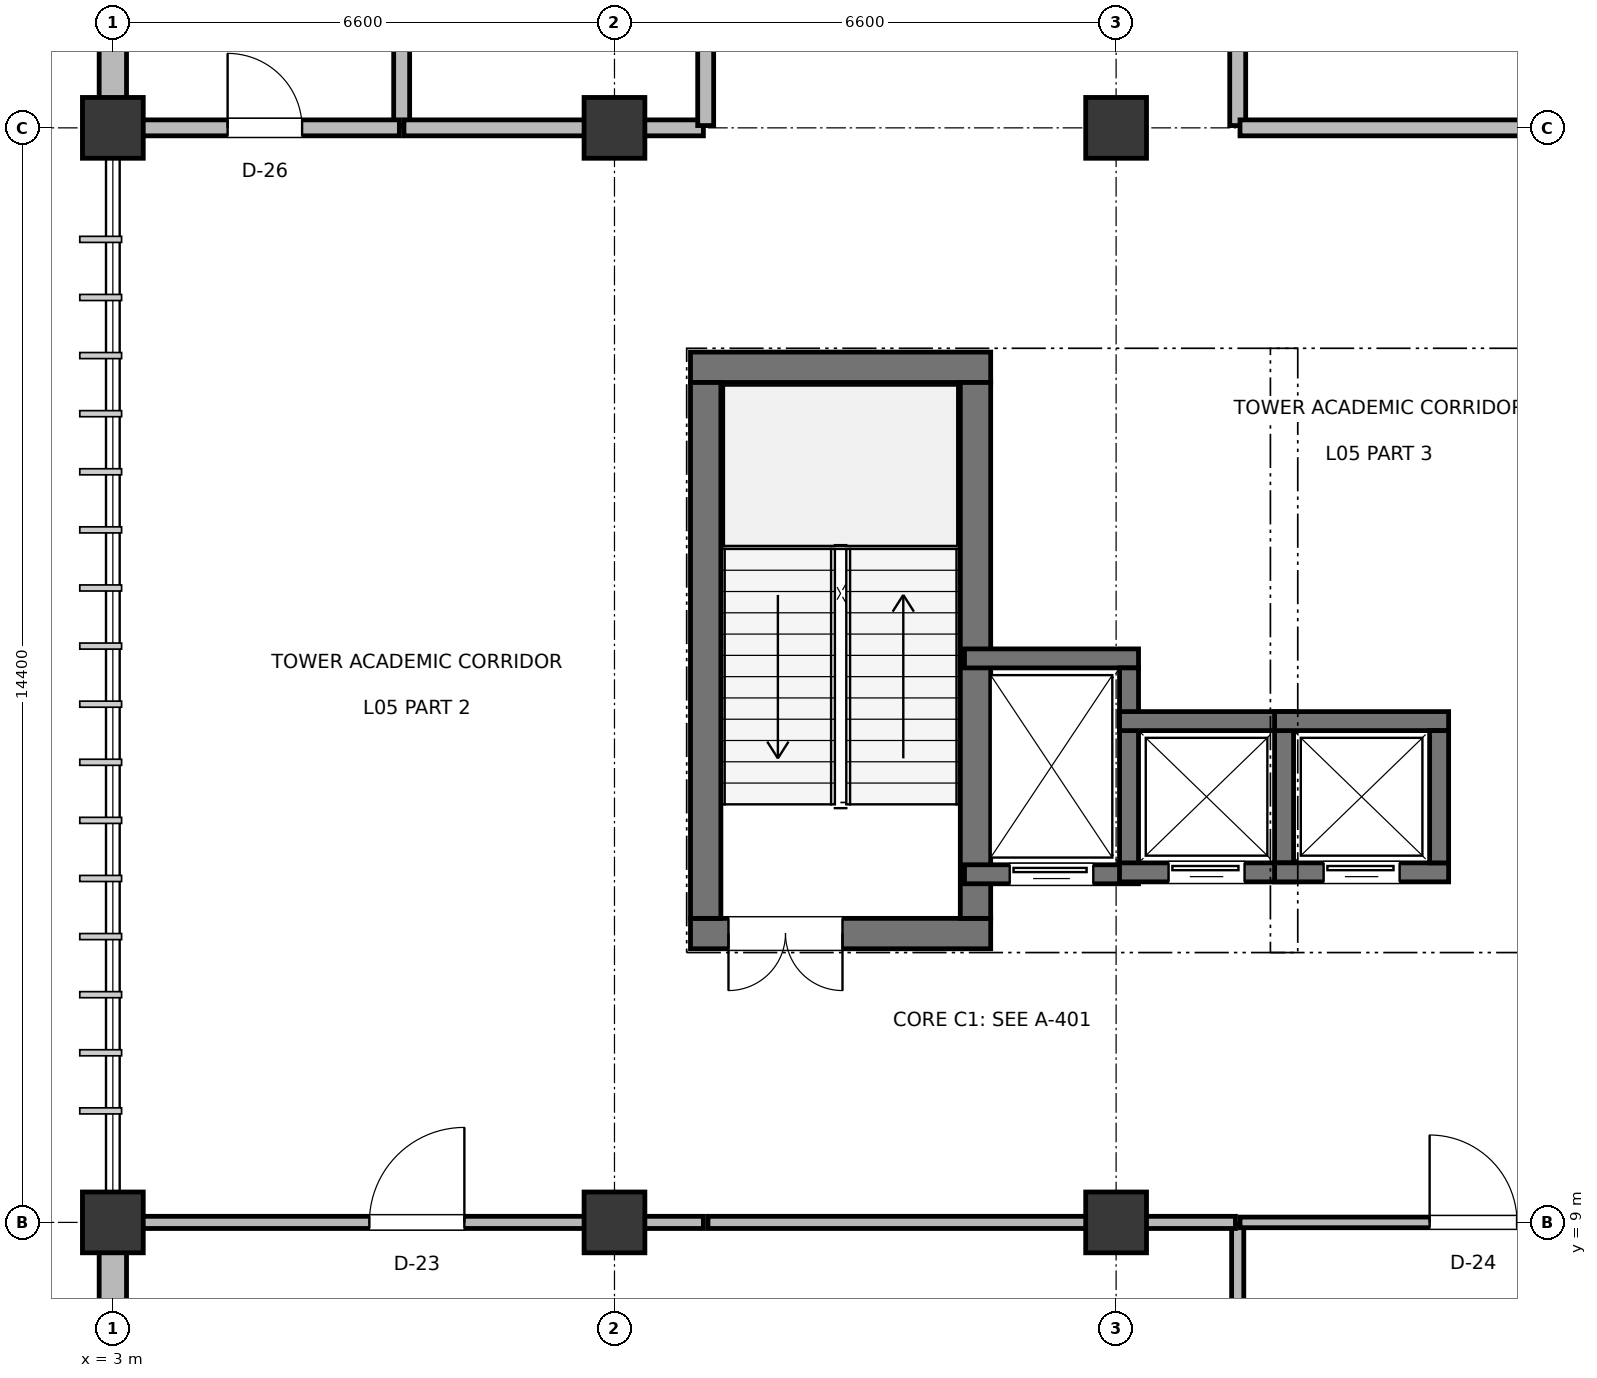
"""IFC4 building model, lengths in metres.
Left out: names, types, materials, properties, quantities, classifications, styles, units other than length and angle.
Written with IfcOpenShell. Run it as: python <this file> out.ifc"""

import sys

from ifc_helpers import new_model, si_unit, direction, frame, frame_2d, origin, origin_2d, place, context, subcontext, project, spatial, rectangle, extrude, element, fill, save


model = new_model("IFC4")
c1 = context("Model", 3, precision=1e-05, world=origin(), true_north=direction((0.0, 1.0)))
c2 = subcontext(c1, "Body", "Model", "MODEL_VIEW")
j1 = project(units=[si_unit("LENGTHUNIT", "METRE"), si_unit("PLANEANGLEUNIT", "RADIAN")], contexts=[c1])
p1 = place(None, origin())
s1 = spatial("IfcSite", under=j1, at=p1, CompositionType="ELEMENT")
p2 = place(p1, origin())
s2 = spatial("IfcBuilding", under=s1, at=p2, CompositionType="ELEMENT")
p3 = place(p2, frame((0.0, 0.0, 24.0)))
s3 = spatial("IfcBuildingStorey", under=s2, at=p3, CompositionType="ELEMENT", Elevation=24.0)
for number, where, z_axis, x_axis in (
    (1, (3.0, 9.0, 0.0), (0.0, 0.0, 1.0), (1.0, 0.0, 0.0)),
    (2, (3.0, 23.4, 0.0), (0.0, 0.0, 1.0), (1.0, 0.0, 0.0)),
    (3, (9.6, 9.0, 0.0), (0.0, 0.0, 1.0), (1.0, 0.0, 0.0)),
    (4, (9.6, 23.4, 0.0), (0.0, 0.0, 1.0), (1.0, 0.0, 0.0)),
    (5, (16.2, 9.0, 0.0), (0.0, 0.0, 1.0), (1.0, 0.0, 0.0)),
    (6, (16.2, 23.4, 0.0), (0.0, 0.0, 1.0), (1.0, 0.0, 0.0)),
):
    element("IfcColumn", number, at=place(p3, frame(where, z_axis=z_axis, x_axis=x_axis)), inside=s3, PredefinedType="COLUMN", context=c2, shape_type="SweptSolid", body=[
        extrude(rectangle(XDim=0.8, YDim=0.8, at=origin_2d()), origin(), (0.0, 0.0, 1.0), 4.5),
    ])
p4 = place(p3, frame((3.0, 3.385, 0.0), z_axis=(0.0, 0.0, 1.0), x_axis=(0.0, 1.0, 0.0)))
e7 = element("IfcWall", 7, at=p4, inside=s3, PredefinedType="SOLIDWALL", context=c2, shape_type="SweptSolid", body=[
    extrude(rectangle(XDim=5.23, YDim=0.36, at=frame_2d((2.615, 0.0))), origin(), (0.0, 0.0, 1.0), 3.575),
])
p5 = place(p4, frame((2.165, 0.0, 0.9)))
e8 = element("IfcOpeningElement", 8, at=p5, cuts=e7, PredefinedType="OPENING", context=c2, shape_type="SweptSolid", body=[
    extrude(rectangle(XDim=0.9, YDim=1.8, at=frame_2d((0.45, 0.9))), frame((0.0, 0.19, 0.0), z_axis=(0.0, -1.0, 0.0), x_axis=(1.0, 0.0, 0.0)), (0.0, 0.0, 1.0), 0.38),
])
p6 = place(p3, frame((3.0, 23.785, 0.0), z_axis=(0.0, 0.0, 1.0), x_axis=(0.0, 1.0, 0.0)))
e9 = element("IfcWall", 9, at=p6, inside=s3, PredefinedType="SOLIDWALL", context=c2, shape_type="SweptSolid", body=[
    extrude(rectangle(XDim=5.83, YDim=0.36, at=frame_2d((2.915, 0.0))), origin(), (0.0, 0.0, 1.0), 3.575),
])
p7 = place(p6, frame((2.39, 0.0, 0.9)))
e10 = element("IfcOpeningElement", 10, at=p7, cuts=e9, PredefinedType="OPENING", context=c2, shape_type="SweptSolid", body=[
    extrude(rectangle(XDim=1.05, YDim=1.8, at=frame_2d((0.525, 0.9))), frame((0.0, 0.19, 0.0), z_axis=(0.0, -1.0, 0.0), x_axis=(1.0, 0.0, 0.0)), (0.0, 0.0, 1.0), 0.38),
])
p8 = place(p3, frame((10.6, 12.8, 0.0), z_axis=(0.0, 0.0, 1.0), x_axis=(1.0, 0.0, 0.0)))
e11 = element("IfcWall", 11, at=p8, inside=s3, PredefinedType="SHEAR", context=c2, shape_type="SweptSolid", body=[
    extrude(rectangle(XDim=3.95, YDim=0.4, at=frame_2d((1.975, 0.0))), origin(), (0.0, 0.0, 1.0), 4.28),
])
p9 = place(p8, frame((0.5, 0.0, 0.0)))
e12 = element("IfcOpeningElement", 12, at=p9, cuts=e11, PredefinedType="OPENING", context=c2, shape_type="SweptSolid", body=[
    extrude(rectangle(XDim=1.5, YDim=2.2, at=frame_2d((0.75, 1.1))), frame((0.0, 0.21, 0.0), z_axis=(0.0, -1.0, 0.0), x_axis=(1.0, 0.0, 0.0)), (0.0, 0.0, 1.0), 0.42),
])
p10 = place(p3, frame((10.6, 20.25, 0.0), z_axis=(0.0, 0.0, 1.0), x_axis=(1.0, 0.0, 0.0)))
e13 = element("IfcWall", 13, at=p10, inside=s3, PredefinedType="SHEAR", context=c2, shape_type="SweptSolid", body=[
    extrude(rectangle(XDim=3.95, YDim=0.4, at=frame_2d((1.975, 0.0))), origin(), (0.0, 0.0, 1.0), 4.28),
])
for number, where, z_axis, x_axis in (
    (14, (10.8, 13.0, 0.0), (0.0, 0.0, 1.0), (0.0, 1.0, 0.0)),
    (15, (14.35, 13.0, 0.0), (0.0, 0.0, 1.0), (0.0, 1.0, 0.0)),
):
    element("IfcWall", number, at=place(p3, frame(where, z_axis=z_axis, x_axis=x_axis)), inside=s3, PredefinedType="SHEAR", context=c2, shape_type="SweptSolid", body=[
        extrude(rectangle(XDim=7.05, YDim=0.4, at=frame_2d((3.525, 0.0))), origin(), (0.0, 0.0, 1.0), 4.28),
    ])
p11 = place(p3, frame((14.205, 13.58, 0.0), z_axis=(0.0, 0.0, 1.0), x_axis=(1.0, 0.0, 0.0)))
e16 = element("IfcWall", 16, at=p11, inside=s3, PredefinedType="SHEAR", context=c2, shape_type="SweptSolid", body=[
    extrude(rectangle(XDim=2.29, YDim=0.25, at=frame_2d((1.145, 0.0))), origin(), (0.0, 0.0, 1.0), 4.26),
])
p12 = place(p11, frame((0.595, 0.0, 0.0)))
e17 = element("IfcOpeningElement", 17, at=p12, cuts=e16, PredefinedType="OPENING", context=c2, shape_type="SweptSolid", body=[
    extrude(rectangle(XDim=1.1, YDim=2.2, at=frame_2d((0.55, 1.1))), frame((0.0, 0.135, 0.0), z_axis=(0.0, -1.0, 0.0), x_axis=(1.0, 0.0, 0.0)), (0.0, 0.0, 1.0), 0.27),
])
p13 = place(p3, frame((14.205, 16.42, 0.0), z_axis=(0.0, 0.0, 1.0), x_axis=(1.0, 0.0, 0.0)))
e18 = element("IfcWall", 18, at=p13, inside=s3, PredefinedType="SHEAR", context=c2, shape_type="SweptSolid", body=[
    extrude(rectangle(XDim=2.29, YDim=0.25, at=frame_2d((1.145, 0.0))), origin(), (0.0, 0.0, 1.0), 4.26),
])
p14 = place(p3, frame((16.37, 13.705, 0.0), z_axis=(0.0, 0.0, 1.0), x_axis=(0.0, 1.0, 0.0)))
e19 = element("IfcWall", 19, at=p14, inside=s3, PredefinedType="SHEAR", context=c2, shape_type="SweptSolid", body=[
    extrude(rectangle(XDim=2.59, YDim=0.25, at=frame_2d((1.295, 0.0))), origin(), (0.0, 0.0, 1.0), 4.26),
])
p15 = place(p3, frame((16.245, 13.605, 0.0), z_axis=(0.0, 0.0, 1.0), x_axis=(1.0, 0.0, 0.0)))
e20 = element("IfcWall", 20, at=p15, inside=s3, PredefinedType="SHEAR", context=c2, shape_type="SweptSolid", body=[
    extrude(rectangle(XDim=2.29, YDim=0.25, at=frame_2d((1.145, 0.0))), origin(), (0.0, 0.0, 1.0), 4.26),
])
p16 = place(p15, frame((0.645, 0.0, 0.0)))
e21 = element("IfcOpeningElement", 21, at=p16, cuts=e20, PredefinedType="OPENING", context=c2, shape_type="SweptSolid", body=[
    extrude(rectangle(XDim=1.0, YDim=2.15, at=frame_2d((0.5, 1.075))), frame((0.0, 0.135, 0.0), z_axis=(0.0, -1.0, 0.0), x_axis=(1.0, 0.0, 0.0)), (0.0, 0.0, 1.0), 0.27),
])
p17 = place(p3, frame((16.245, 15.595, 0.0), z_axis=(0.0, 0.0, 1.0), x_axis=(1.0, 0.0, 0.0)))
e22 = element("IfcWall", 22, at=p17, inside=s3, PredefinedType="SHEAR", context=c2, shape_type="SweptSolid", body=[
    extrude(rectangle(XDim=2.29, YDim=0.25, at=frame_2d((1.145, 0.0))), origin(), (0.0, 0.0, 1.0), 4.26),
])
p18 = place(p3, frame((18.41, 13.73, 0.0), z_axis=(0.0, 0.0, 1.0), x_axis=(0.0, 1.0, 0.0)))
e23 = element("IfcWall", 23, at=p18, inside=s3, PredefinedType="SHEAR", context=c2, shape_type="SweptSolid", body=[
    extrude(rectangle(XDim=1.74, YDim=0.25, at=frame_2d((0.87, 0.0))), origin(), (0.0, 0.0, 1.0), 4.26),
])
p19 = place(p3, frame((18.285, 13.605, 0.0), z_axis=(0.0, 0.0, 1.0), x_axis=(1.0, 0.0, 0.0)))
e24 = element("IfcWall", 24, at=p19, inside=s3, PredefinedType="SHEAR", context=c2, shape_type="SweptSolid", body=[
    extrude(rectangle(XDim=2.29, YDim=0.25, at=frame_2d((1.145, 0.0))), origin(), (0.0, 0.0, 1.0), 4.26),
])
p20 = place(p19, frame((0.645, 0.0, 0.0)))
e25 = element("IfcOpeningElement", 25, at=p20, cuts=e24, PredefinedType="OPENING", context=c2, shape_type="SweptSolid", body=[
    extrude(rectangle(XDim=1.0, YDim=2.15, at=frame_2d((0.5, 1.075))), frame((0.0, 0.135, 0.0), z_axis=(0.0, -1.0, 0.0), x_axis=(1.0, 0.0, 0.0)), (0.0, 0.0, 1.0), 0.27),
])
p21 = place(p3, frame((18.285, 15.595, 0.0), z_axis=(0.0, 0.0, 1.0), x_axis=(1.0, 0.0, 0.0)))
e26 = element("IfcWall", 26, at=p21, inside=s3, PredefinedType="SHEAR", context=c2, shape_type="SweptSolid", body=[
    extrude(rectangle(XDim=2.29, YDim=0.25, at=frame_2d((1.145, 0.0))), origin(), (0.0, 0.0, 1.0), 4.26),
])
p22 = place(p3, frame((20.45, 13.73, 0.0), z_axis=(0.0, 0.0, 1.0), x_axis=(0.0, 1.0, 0.0)))
e27 = element("IfcWall", 27, at=p22, inside=s3, PredefinedType="SHEAR", context=c2, shape_type="SweptSolid", body=[
    extrude(rectangle(XDim=1.74, YDim=0.25, at=frame_2d((0.87, 0.0))), origin(), (0.0, 0.0, 1.0), 4.26),
])
p23 = place(p3, frame((17.8, 3.23, 0.0), z_axis=(0.0, 0.0, 1.0), x_axis=(0.0, 1.0, 0.0)))
e28 = element("IfcWall", 28, at=p23, inside=s3, PredefinedType="PARTITIONING", context=c2, shape_type="SweptSolid", body=[
    extrude(rectangle(XDim=5.74, YDim=0.16, at=frame_2d((2.87, 0.0))), origin(), (0.0, 0.0, 1.0), 3.525),
])
p24 = place(p3, frame((3.23, 9.0, 0.0), z_axis=(0.0, 0.0, 1.0), x_axis=(1.0, 0.0, 0.0)))
e29 = element("IfcWall", 29, at=p24, inside=s3, PredefinedType="PARTITIONING", context=c2, shape_type="SweptSolid", body=[
    extrude(rectangle(XDim=7.54, YDim=0.16, at=frame_2d((3.77, 0.0))), origin(), (0.0, 0.0, 1.0), 3.495),
])
p25 = place(p24, frame((3.145, 0.0, 0.0)))
e30 = element("IfcOpeningElement", 30, at=p25, cuts=e29, PredefinedType="OPENING", context=c2, shape_type="SweptSolid", body=[
    extrude(rectangle(XDim=1.25, YDim=2.2, at=frame_2d((0.625, 1.1))), frame((0.0, 0.09, 0.0), z_axis=(0.0, -1.0, 0.0), x_axis=(1.0, 0.0, 0.0)), (0.0, 0.0, 1.0), 0.18),
])
p26 = place(p3, frame((10.83, 9.0, 0.0), z_axis=(0.0, 0.0, 1.0), x_axis=(1.0, 0.0, 0.0)))
e31 = element("IfcWall", 31, at=p26, inside=s3, PredefinedType="PARTITIONING", context=c2, shape_type="SweptSolid", body=[
    extrude(rectangle(XDim=6.94, YDim=0.16, at=frame_2d((3.47, 0.0))), origin(), (0.0, 0.0, 1.0), 3.495),
])
p27 = place(p3, frame((17.83, 9.0, 0.0), z_axis=(0.0, 0.0, 1.0), x_axis=(1.0, 0.0, 0.0)))
e32 = element("IfcWall", 32, at=p27, inside=s3, PredefinedType="PARTITIONING", context=c2, shape_type="SweptSolid", body=[
    extrude(rectangle(XDim=6.14, YDim=0.14, at=frame_2d((3.07, 0.0))), origin(), (0.0, 0.0, 1.0), 3.455),
])
p28 = place(p27, frame((2.495, 0.0, 0.0)))
e33 = element("IfcOpeningElement", 33, at=p28, cuts=e32, PredefinedType="OPENING", context=c2, shape_type="SweptSolid", body=[
    extrude(rectangle(XDim=1.15, YDim=2.15, at=frame_2d((0.575, 1.075))), frame((0.0, 0.08, 0.0), z_axis=(0.0, -1.0, 0.0), x_axis=(1.0, 0.0, 0.0)), (0.0, 0.0, 1.0), 0.16),
])
p29 = place(p3, frame((6.8, 23.43, 0.0), z_axis=(0.0, 0.0, 1.0), x_axis=(0.0, 1.0, 0.0)))
e34 = element("IfcWall", 34, at=p29, inside=s3, PredefinedType="PLUMBINGWALL", context=c2, shape_type="SweptSolid", body=[
    extrude(rectangle(XDim=6.54, YDim=0.21, at=frame_2d((3.27, 0.0))), origin(), (0.0, 0.0, 1.0), 3.415),
])
p30 = place(p3, frame((3.23, 23.4, 0.0), z_axis=(0.0, 0.0, 1.0), x_axis=(1.0, 0.0, 0.0)))
e35 = element("IfcWall", 35, at=p30, inside=s3, PredefinedType="PLUMBINGWALL", context=c2, shape_type="SweptSolid", body=[
    extrude(rectangle(XDim=3.54, YDim=0.21, at=frame_2d((1.77, 0.0))), origin(), (0.0, 0.0, 1.0), 3.415),
])
p31 = place(p30, frame((1.28, 0.0, 0.0)))
e36 = element("IfcOpeningElement", 36, at=p31, cuts=e35, PredefinedType="OPENING", context=c2, shape_type="SweptSolid", body=[
    extrude(rectangle(XDim=0.98, YDim=2.1, at=frame_2d((0.49, 1.05))), frame((0.0, 0.115, 0.0), z_axis=(0.0, -1.0, 0.0), x_axis=(1.0, 0.0, 0.0)), (0.0, 0.0, 1.0), 0.23),
])
p32 = place(p3, frame((6.83, 23.4, 0.0), z_axis=(0.0, 0.0, 1.0), x_axis=(1.0, 0.0, 0.0)))
e37 = element("IfcWall", 37, at=p32, inside=s3, PredefinedType="PLUMBINGWALL", context=c2, shape_type="SweptSolid", body=[
    extrude(rectangle(XDim=3.94, YDim=0.21, at=frame_2d((1.97, 0.0))), origin(), (0.0, 0.0, 1.0), 3.415),
])
p33 = place(p3, frame((10.8, 23.43, 0.0), z_axis=(0.0, 0.0, 1.0), x_axis=(0.0, 1.0, 0.0)))
e38 = element("IfcWall", 38, at=p33, inside=s3, PredefinedType="PLUMBINGWALL", context=c2, shape_type="SweptSolid", body=[
    extrude(rectangle(XDim=6.54, YDim=0.21, at=frame_2d((3.27, 0.0))), origin(), (0.0, 0.0, 1.0), 3.525),
])
p34 = place(p33, frame((2.81, 0.0, 0.0)))
e39 = element("IfcOpeningElement", 39, at=p34, cuts=e38, PredefinedType="OPENING", context=c2, shape_type="SweptSolid", body=[
    extrude(rectangle(XDim=0.92, YDim=2.1, at=frame_2d((0.46, 1.05))), frame((0.0, 0.115, 0.0), z_axis=(0.0, -1.0, 0.0), x_axis=(1.0, 0.0, 0.0)), (0.0, 0.0, 1.0), 0.23),
])
p35 = place(p3, frame((17.8, 23.43, 0.0), z_axis=(0.0, 0.0, 1.0), x_axis=(0.0, 1.0, 0.0)))
e40 = element("IfcWall", 40, at=p35, inside=s3, PredefinedType="PLUMBINGWALL", context=c2, shape_type="SweptSolid", body=[
    extrude(rectangle(XDim=6.54, YDim=0.21, at=frame_2d((3.27, 0.0))), origin(), (0.0, 0.0, 1.0), 3.395),
])
p36 = place(p35, frame((2.81, 0.0, 0.0)))
e41 = element("IfcOpeningElement", 41, at=p36, cuts=e40, PredefinedType="OPENING", context=c2, shape_type="SweptSolid", body=[
    extrude(rectangle(XDim=0.92, YDim=2.1, at=frame_2d((0.46, 1.05))), frame((0.0, 0.115, 0.0), z_axis=(0.0, -1.0, 0.0), x_axis=(1.0, 0.0, 0.0)), (0.0, 0.0, 1.0), 0.23),
])
p37 = place(p3, frame((17.83, 23.4, 0.0), z_axis=(0.0, 0.0, 1.0), x_axis=(1.0, 0.0, 0.0)))
e42 = element("IfcWall", 42, at=p37, inside=s3, PredefinedType="PLUMBINGWALL", context=c2, shape_type="SweptSolid", body=[
    extrude(rectangle(XDim=6.14, YDim=0.21, at=frame_2d((3.07, 0.0))), origin(), (0.0, 0.0, 1.0), 3.395),
])
p38 = place(p9, frame((1.5, 0.0, 0.0), z_axis=(0.0, 0.0, 1.0), x_axis=(-1.0, 0.0, 0.0)))
e43 = element("IfcDoor", 43, at=p38, inside=s3, OperationType="DOUBLE_DOOR_SINGLE_SWING", PredefinedType="DOOR", context=c2, shape_type="SweptSolid", body=[
    extrude(rectangle(XDim=1.5, YDim=2.2, at=frame_2d((0.75, 1.1))), frame((0.0, 0.025, 0.0), z_axis=(0.0, -1.0, 0.0), x_axis=(1.0, 0.0, 0.0)), (0.0, 0.0, 1.0), 0.05),
])
fill(e12, e43)
p39 = place(p12, frame((1.1, 0.0, 0.0), z_axis=(0.0, 0.0, 1.0), x_axis=(-1.0, 0.0, 0.0)))
e44 = element("IfcDoor", 44, at=p39, inside=s3, OperationType="SLIDING_TO_LEFT", PredefinedType="DOOR", context=c2, shape_type="SweptSolid", body=[
    extrude(rectangle(XDim=1.1, YDim=2.2, at=frame_2d((0.55, 1.1))), frame((0.0, 0.025, 0.0), z_axis=(0.0, -1.0, 0.0), x_axis=(1.0, 0.0, 0.0)), (0.0, 0.0, 1.0), 0.05),
])
fill(e17, e44)
p40 = place(p16, frame((1.0, 0.0, 0.0), z_axis=(0.0, 0.0, 1.0), x_axis=(-1.0, 0.0, 0.0)))
e45 = element("IfcDoor", 45, at=p40, inside=s3, OperationType="SLIDING_TO_LEFT", PredefinedType="DOOR", context=c2, shape_type="SweptSolid", body=[
    extrude(rectangle(XDim=1.0, YDim=2.15, at=frame_2d((0.5, 1.075))), frame((0.0, 0.025, 0.0), z_axis=(0.0, -1.0, 0.0), x_axis=(1.0, 0.0, 0.0)), (0.0, 0.0, 1.0), 0.05),
])
fill(e21, e45)
p41 = place(p20, frame((1.0, 0.0, 0.0), z_axis=(0.0, 0.0, 1.0), x_axis=(-1.0, 0.0, 0.0)))
e46 = element("IfcDoor", 46, at=p41, inside=s3, OperationType="SLIDING_TO_LEFT", PredefinedType="DOOR", context=c2, shape_type="SweptSolid", body=[
    extrude(rectangle(XDim=1.0, YDim=2.15, at=frame_2d((0.5, 1.075))), frame((0.0, 0.025, 0.0), z_axis=(0.0, -1.0, 0.0), x_axis=(1.0, 0.0, 0.0)), (0.0, 0.0, 1.0), 0.05),
])
fill(e25, e46)
p42 = place(p25, origin())
e47 = element("IfcDoor", 47, at=p42, inside=s3, OperationType="SINGLE_SWING_RIGHT", PredefinedType="DOOR", context=c2, shape_type="SweptSolid", body=[
    extrude(rectangle(XDim=1.25, YDim=2.2, at=frame_2d((0.625, 1.1))), frame((0.0, 0.025, 0.0), z_axis=(0.0, -1.0, 0.0), x_axis=(1.0, 0.0, 0.0)), (0.0, 0.0, 1.0), 0.05),
])
fill(e30, e47)
p43 = place(p28, origin())
e48 = element("IfcDoor", 48, at=p43, inside=s3, OperationType="SINGLE_SWING_LEFT", PredefinedType="DOOR", context=c2, shape_type="SweptSolid", body=[
    extrude(rectangle(XDim=1.15, YDim=2.15, at=frame_2d((0.575, 1.075))), frame((0.0, 0.025, 0.0), z_axis=(0.0, -1.0, 0.0), x_axis=(1.0, 0.0, 0.0)), (0.0, 0.0, 1.0), 0.05),
])
fill(e33, e48)
p44 = place(p31, origin())
e49 = element("IfcDoor", 49, at=p44, inside=s3, OperationType="SINGLE_SWING_LEFT", PredefinedType="DOOR", context=c2, shape_type="SweptSolid", body=[
    extrude(rectangle(XDim=0.98, YDim=2.1, at=frame_2d((0.49, 1.05))), frame((0.0, 0.025, 0.0), z_axis=(0.0, -1.0, 0.0), x_axis=(1.0, 0.0, 0.0)), (0.0, 0.0, 1.0), 0.05),
])
fill(e36, e49)
save(model, sys.argv[1])
